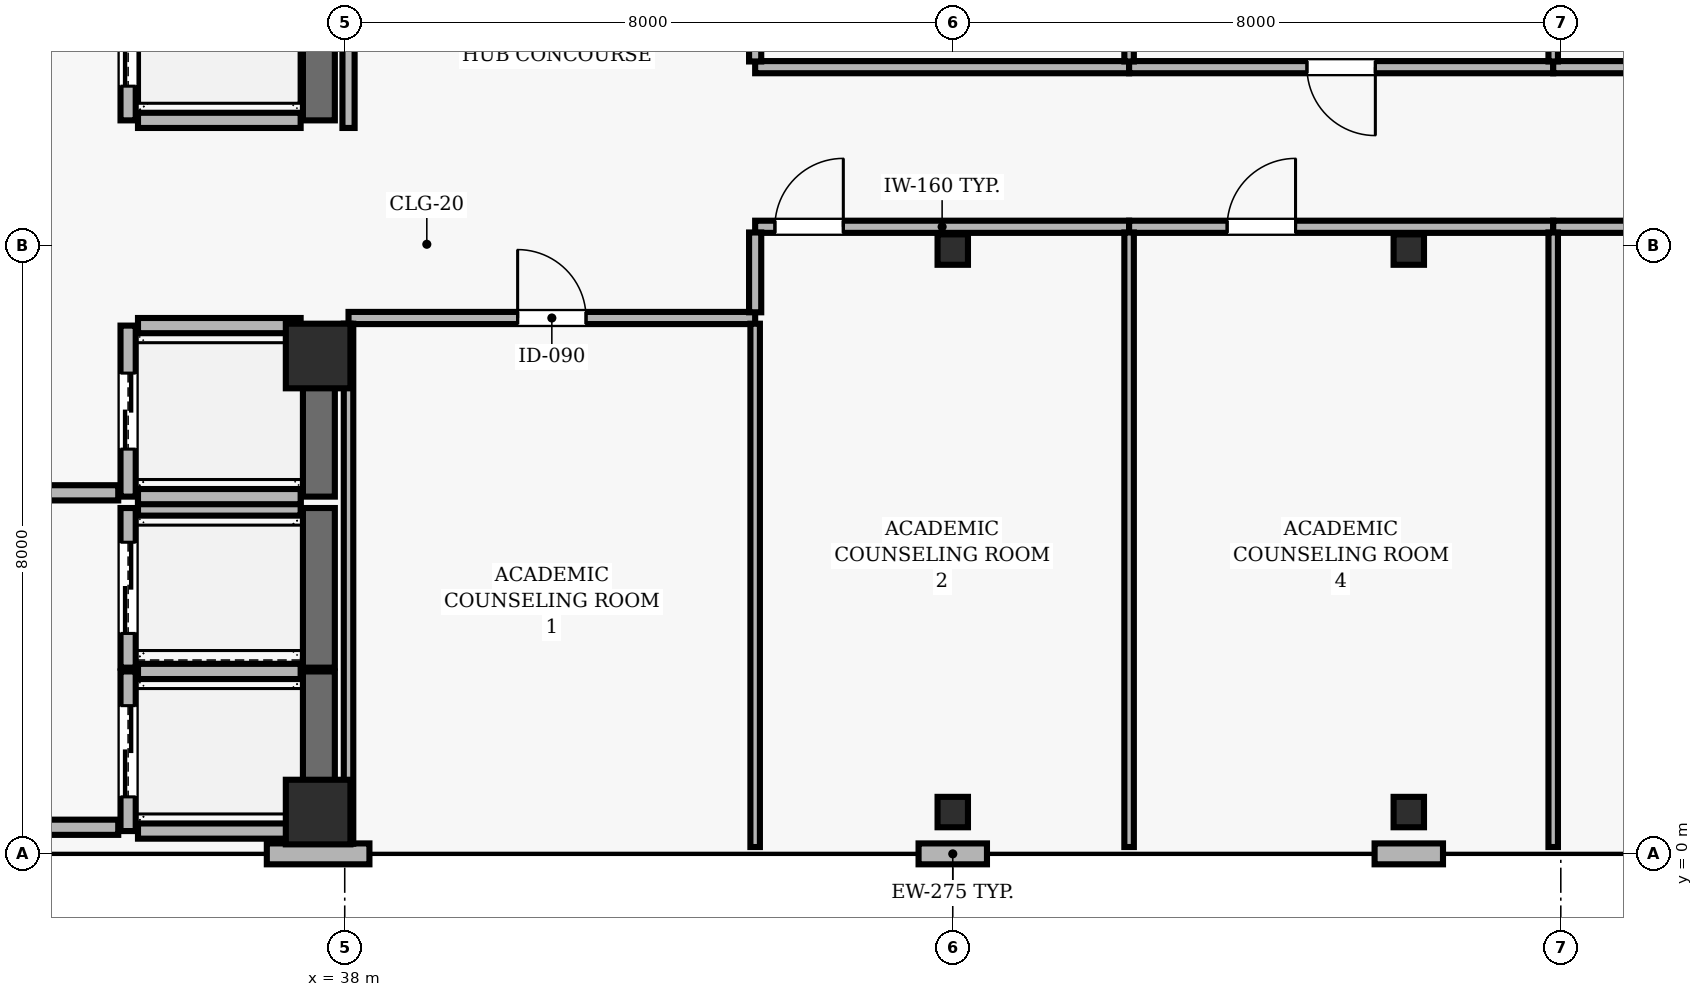
"""IFC4 building model, lengths in metres.
Left out: names, types, materials, properties, quantities, classifications, styles, units other than length and angle.
Written with IfcOpenShell. Run it as: python <this file> out.ifc"""

import sys

from ifc_helpers import new_model, si_unit, direction, frame, frame_2d, origin, origin_2d, place, context, subcontext, project, spatial, rectangle, hollow_rectangle, extrude, element, fill, save


model = new_model("IFC4")
c1 = context("Model", 3, precision=1e-05, world=origin(), true_north=direction((0.0, 1.0)))
c2 = subcontext(c1, "Body", "Model", "MODEL_VIEW")
j1 = project(units=[si_unit("LENGTHUNIT", "METRE"), si_unit("PLANEANGLEUNIT", "RADIAN")], contexts=[c1])
p1 = place(None, origin())
s1 = spatial("IfcSite", under=j1, at=p1, CompositionType="ELEMENT")
p2 = place(p1, origin())
s2 = spatial("IfcBuilding", under=s1, at=p2, CompositionType="ELEMENT")
p3 = place(p2, frame((0.0, 0.0, 295.0)))
s3 = spatial("IfcBuildingStorey", under=s2, at=p3, CompositionType="ELEMENT", Elevation=295.0)
for number, where, z_axis, x_axis in (
    (1, (37.65, 0.55, 0.0), (0.0, 0.0, 1.0), (1.0, 0.0, 0.0)),
    (2, (37.65, 6.55, 0.0), (0.0, 0.0, 1.0), (1.0, 0.0, 0.0)),
):
    element("IfcColumn", number, at=place(p3, frame(where, z_axis=z_axis, x_axis=x_axis)), inside=s3, PredefinedType="COLUMN", context=c2, shape_type="SweptSolid", body=[
        extrude(rectangle(XDim=0.85, YDim=0.85, at=origin_2d()), origin(), (0.0, 0.0, 1.0), 3.9),
    ])
for number, where, z_axis, x_axis in (
    (3, (46.0, 0.55, 0.0), (0.0, 0.0, 1.0), (1.0, 0.0, 0.0)),
    (4, (46.0, 7.95, 0.0), (0.0, 0.0, 1.0), (1.0, 0.0, 0.0)),
    (5, (52.0, 0.55, 0.0), (0.0, 0.0, 1.0), (1.0, 0.0, 0.0)),
    (6, (52.0, 7.95, 0.0), (0.0, 0.0, 1.0), (1.0, 0.0, 0.0)),
):
    element("IfcColumn", number, at=place(p3, frame(where, z_axis=z_axis, x_axis=x_axis)), inside=s3, PredefinedType="COLUMN", context=c2, shape_type="SweptSolid", body=[
        extrude(hollow_rectangle(XDim=0.4, YDim=0.4, WallThickness=0.02, at=origin_2d()), origin(), (0.0, 0.0, 1.0), 3.9),
    ])
p4 = place(p3, frame((36.975, 0.0, 0.0), z_axis=(0.0, 0.0, 1.0), x_axis=(1.0, 0.0, 0.0)))
e7 = element("IfcWall", 7, at=p4, inside=s3, PredefinedType="SOLIDWALL", context=c2, shape_type="SweptSolid", body=[
    extrude(rectangle(XDim=1.35, YDim=0.275, at=frame_2d((0.675, 0.0))), origin(), (0.0, 0.0, 1.0), 3.69),
])
for number, where, z_axis, x_axis in (
    (8, (45.55, 0.0, 0.0), (0.0, 0.0, 1.0), (1.0, 0.0, 0.0)),
    (9, (51.55, 0.0, 0.0), (0.0, 0.0, 1.0), (1.0, 0.0, 0.0)),
):
    element("IfcWall", number, at=place(p3, frame(where, z_axis=z_axis, x_axis=x_axis)), inside=s3, PredefinedType="SOLIDWALL", context=c2, shape_type="SweptSolid", body=[
        extrude(rectangle(XDim=0.9, YDim=0.275, at=frame_2d((0.45, 0.0))), origin(), (0.0, 0.0, 1.0), 3.69),
    ])
p5 = place(p3, frame((35.15, 2.4, 0.0), z_axis=(0.0, 0.0, 1.0), x_axis=(0.0, -1.0, 0.0)))
e10 = element("IfcWall", 10, at=p5, inside=s3, PredefinedType="SOLIDWALL", context=c2, shape_type="SweptSolid", body=[
    extrude(rectangle(XDim=2.1, YDim=0.2, at=frame_2d((1.05, 0.0))), origin(), (0.0, 0.0, 1.0), 3.69),
])
p6 = place(p5, frame((0.45, 0.0, 0.0)))
e11 = element("IfcOpeningElement", 11, at=p6, cuts=e10, PredefinedType="OPENING", context=c2, shape_type="SweptSolid", body=[
    extrude(rectangle(XDim=1.2, YDim=2.15, at=frame_2d((0.6, 1.075))), frame((0.0, 0.11, 0.0), z_axis=(0.0, -1.0, 0.0), x_axis=(1.0, 0.0, 0.0)), (0.0, 0.0, 1.0), 0.22),
])
p7 = place(p3, frame((37.66, 0.3, 0.0), z_axis=(0.0, 0.0, 1.0), x_axis=(0.0, 1.0, 0.0)))
e12 = element("IfcWall", 12, at=p7, inside=s3, PredefinedType="SHEAR", context=c2, shape_type="SweptSolid", body=[
    extrude(rectangle(XDim=2.1, YDim=0.42, at=frame_2d((1.05, 0.0))), origin(), (0.0, 0.0, 1.0), 3.69),
])
for number, where, z_axis, x_axis in (
    (13, (35.28, 0.3, 0.0), (0.0, 0.0, 1.0), (1.0, 0.0, 0.0)),
    (14, (37.42, 2.4, 0.0), (0.0, 0.0, 1.0), (-1.0, 0.0, 0.0)),
):
    element("IfcWall", number, at=place(p3, frame(where, z_axis=z_axis, x_axis=x_axis)), inside=s3, PredefinedType="SOLIDWALL", context=c2, shape_type="SweptSolid", body=[
        extrude(rectangle(XDim=2.14, YDim=0.2, at=frame_2d((1.07, 0.0))), origin(), (0.0, 0.0, 1.0), 3.69),
    ])
p8 = place(p3, frame((35.15, 4.55, 0.0), z_axis=(0.0, 0.0, 1.0), x_axis=(0.0, -1.0, 0.0)))
e15 = element("IfcWall", 15, at=p8, inside=s3, PredefinedType="SOLIDWALL", context=c2, shape_type="SweptSolid", body=[
    extrude(rectangle(XDim=2.1, YDim=0.2, at=frame_2d((1.05, 0.0))), origin(), (0.0, 0.0, 1.0), 3.69),
])
p9 = place(p8, frame((0.45, 0.0, 0.0)))
e16 = element("IfcOpeningElement", 16, at=p9, cuts=e15, PredefinedType="OPENING", context=c2, shape_type="SweptSolid", body=[
    extrude(rectangle(XDim=1.2, YDim=2.15, at=frame_2d((0.6, 1.075))), frame((0.0, 0.11, 0.0), z_axis=(0.0, -1.0, 0.0), x_axis=(1.0, 0.0, 0.0)), (0.0, 0.0, 1.0), 0.22),
])
p10 = place(p3, frame((37.66, 2.45, 0.0), z_axis=(0.0, 0.0, 1.0), x_axis=(0.0, 1.0, 0.0)))
e17 = element("IfcWall", 17, at=p10, inside=s3, PredefinedType="SHEAR", context=c2, shape_type="SweptSolid", body=[
    extrude(rectangle(XDim=2.1, YDim=0.42, at=frame_2d((1.05, 0.0))), origin(), (0.0, 0.0, 1.0), 3.69),
])
p11 = place(p3, frame((37.42, 4.55, 0.0), z_axis=(0.0, 0.0, 1.0), x_axis=(-1.0, 0.0, 0.0)))
e18 = element("IfcWall", 18, at=p11, inside=s3, PredefinedType="SOLIDWALL", context=c2, shape_type="SweptSolid", body=[
    extrude(rectangle(XDim=2.14, YDim=0.2, at=frame_2d((1.07, 0.0))), origin(), (0.0, 0.0, 1.0), 3.69),
])
p12 = place(p3, frame((35.15, 6.95, 0.0), z_axis=(0.0, 0.0, 1.0), x_axis=(0.0, -1.0, 0.0)))
e19 = element("IfcWall", 19, at=p12, inside=s3, PredefinedType="SOLIDWALL", context=c2, shape_type="SweptSolid", body=[
    extrude(rectangle(XDim=2.25, YDim=0.2, at=frame_2d((1.125, 0.0))), origin(), (0.0, 0.0, 1.0), 3.69),
])
p13 = place(p12, frame((0.625, 0.0, 0.0)))
e20 = element("IfcOpeningElement", 20, at=p13, cuts=e19, PredefinedType="OPENING", context=c2, shape_type="SweptSolid", body=[
    extrude(rectangle(XDim=1.0, YDim=2.1, at=frame_2d((0.5, 1.05))), frame((0.0, 0.11, 0.0), z_axis=(0.0, -1.0, 0.0), x_axis=(1.0, 0.0, 0.0)), (0.0, 0.0, 1.0), 0.22),
])
p14 = place(p3, frame((37.66, 4.7, 0.0), z_axis=(0.0, 0.0, 1.0), x_axis=(0.0, 1.0, 0.0)))
e21 = element("IfcWall", 21, at=p14, inside=s3, PredefinedType="SHEAR", context=c2, shape_type="SweptSolid", body=[
    extrude(rectangle(XDim=2.25, YDim=0.42, at=frame_2d((1.125, 0.0))), origin(), (0.0, 0.0, 1.0), 3.69),
])
for number, where, z_axis, x_axis in (
    (22, (35.28, 4.7, 0.0), (0.0, 0.0, 1.0), (1.0, 0.0, 0.0)),
    (23, (37.42, 6.95, 0.0), (0.0, 0.0, 1.0), (-1.0, 0.0, 0.0)),
):
    element("IfcWall", number, at=place(p3, frame(where, z_axis=z_axis, x_axis=x_axis)), inside=s3, PredefinedType="SOLIDWALL", context=c2, shape_type="SweptSolid", body=[
        extrude(rectangle(XDim=2.14, YDim=0.2, at=frame_2d((1.07, 0.0))), origin(), (0.0, 0.0, 1.0), 3.69),
    ])
p15 = place(p3, frame((35.15, 11.55, 0.0), z_axis=(0.0, 0.0, 1.0), x_axis=(0.0, -1.0, 0.0)))
e24 = element("IfcWall", 24, at=p15, inside=s3, PredefinedType="SOLIDWALL", context=c2, shape_type="SweptSolid", body=[
    extrude(rectangle(XDim=1.9, YDim=0.2, at=frame_2d((0.95, 0.0))), origin(), (0.0, 0.0, 1.0), 3.69),
])
p16 = place(p15, frame((0.45, 0.0, 0.0)))
e25 = element("IfcOpeningElement", 25, at=p16, cuts=e24, PredefinedType="OPENING", context=c2, shape_type="SweptSolid", body=[
    extrude(rectangle(XDim=1.0, YDim=2.1, at=frame_2d((0.5, 1.05))), frame((0.0, 0.11, 0.0), z_axis=(0.0, -1.0, 0.0), x_axis=(1.0, 0.0, 0.0)), (0.0, 0.0, 1.0), 0.22),
])
p17 = place(p3, frame((37.66, 9.65, 0.0), z_axis=(0.0, 0.0, 1.0), x_axis=(0.0, 1.0, 0.0)))
e26 = element("IfcWall", 26, at=p17, inside=s3, PredefinedType="SHEAR", context=c2, shape_type="SweptSolid", body=[
    extrude(rectangle(XDim=1.9, YDim=0.42, at=frame_2d((0.95, 0.0))), origin(), (0.0, 0.0, 1.0), 3.69),
])
p18 = place(p3, frame((35.28, 9.65, 0.0), z_axis=(0.0, 0.0, 1.0), x_axis=(1.0, 0.0, 0.0)))
e27 = element("IfcWall", 27, at=p18, inside=s3, PredefinedType="SOLIDWALL", context=c2, shape_type="SweptSolid", body=[
    extrude(rectangle(XDim=2.14, YDim=0.2, at=frame_2d((1.07, 0.0))), origin(), (0.0, 0.0, 1.0), 3.69),
])
p19 = place(p3, frame((31.65, 0.35, 0.0), z_axis=(0.0, 0.0, 1.0), x_axis=(1.0, 0.0, 0.0)))
e28 = element("IfcWall", 28, at=p19, inside=s3, PredefinedType="SOLIDWALL", context=c2, shape_type="SweptSolid", body=[
    extrude(rectangle(XDim=3.37, YDim=0.2, at=frame_2d((1.685, 0.0))), origin(), (0.0, 0.0, 1.0), 3.69),
])
p20 = place(p3, frame((35.02, 4.75, 0.0), z_axis=(0.0, 0.0, 1.0), x_axis=(-1.0, 0.0, 0.0)))
e29 = element("IfcWall", 29, at=p20, inside=s3, PredefinedType="SOLIDWALL", context=c2, shape_type="SweptSolid", body=[
    extrude(rectangle(XDim=3.11, YDim=0.2, at=frame_2d((1.555, 0.0))), origin(), (0.0, 0.0, 1.0), 3.69),
])
p21 = place(p20, frame((1.03, 0.0, 0.0)))
e30 = element("IfcOpeningElement", 30, at=p21, cuts=e29, PredefinedType="OPENING", context=c2, shape_type="SweptSolid", body=[
    extrude(rectangle(XDim=1.05, YDim=2.15, at=frame_2d((0.525, 1.075))), frame((0.0, 0.11, 0.0), z_axis=(0.0, -1.0, 0.0), x_axis=(1.0, 0.0, 0.0)), (0.0, 0.0, 1.0), 0.22),
])
p22 = place(p3, frame((38.05, 7.05, 0.0), z_axis=(0.0, 0.0, 1.0), x_axis=(1.0, 0.0, 0.0)))
e31 = element("IfcWall", 31, at=p22, inside=s3, PredefinedType="PARTITIONING", context=c2, shape_type="SweptSolid", body=[
    extrude(rectangle(XDim=5.35, YDim=0.16, at=frame_2d((2.675, 0.0))), origin(), (0.0, 0.0, 1.0), 3.69),
])
p23 = place(p22, frame((2.225, 0.0, 0.0)))
e32 = element("IfcOpeningElement", 32, at=p23, cuts=e31, PredefinedType="OPENING", context=c2, shape_type="SweptSolid", body=[
    extrude(rectangle(XDim=0.9, YDim=2.1, at=frame_2d((0.45, 1.05))), frame((0.0, 0.09, 0.0), z_axis=(0.0, -1.0, 0.0), x_axis=(1.0, 0.0, 0.0)), (0.0, 0.0, 1.0), 0.18),
])
p24 = place(p3, frame((43.4, 8.25, 0.0), z_axis=(0.0, 0.0, 1.0), x_axis=(1.0, 0.0, 0.0)))
e33 = element("IfcWall", 33, at=p24, inside=s3, PredefinedType="PARTITIONING", context=c2, shape_type="SweptSolid", body=[
    extrude(rectangle(XDim=4.92, YDim=0.16, at=frame_2d((2.46, 0.0))), origin(), (0.0, 0.0, 1.0), 3.221),
])
p25 = place(p24, frame((0.26, 0.0, 0.0)))
e34 = element("IfcOpeningElement", 34, at=p25, cuts=e33, PredefinedType="OPENING", context=c2, shape_type="SweptSolid", body=[
    extrude(rectangle(XDim=0.9, YDim=2.1, at=frame_2d((0.45, 1.05))), frame((0.0, 0.09, 0.0), z_axis=(0.0, -1.0, 0.0), x_axis=(1.0, 0.0, 0.0)), (0.0, 0.0, 1.0), 0.18),
])
p26 = place(p3, frame((48.32, 8.25, 0.0), z_axis=(0.0, 0.0, 1.0), x_axis=(1.0, 0.0, 0.0)))
e35 = element("IfcWall", 35, at=p26, inside=s3, PredefinedType="PARTITIONING", context=c2, shape_type="SweptSolid", body=[
    extrude(rectangle(XDim=5.58, YDim=0.16, at=frame_2d((2.79, 0.0))), origin(), (0.0, 0.0, 1.0), 3.221),
])
p27 = place(p26, frame((1.29, 0.0, 0.0)))
e36 = element("IfcOpeningElement", 36, at=p27, cuts=e35, PredefinedType="OPENING", context=c2, shape_type="SweptSolid", body=[
    extrude(rectangle(XDim=0.9, YDim=2.1, at=frame_2d((0.45, 1.05))), frame((0.0, 0.09, 0.0), z_axis=(0.0, -1.0, 0.0), x_axis=(1.0, 0.0, 0.0)), (0.0, 0.0, 1.0), 0.18),
])
p28 = place(p3, frame((48.32, 10.35, 0.0), z_axis=(0.0, 0.0, 1.0), x_axis=(-1.0, 0.0, 0.0)))
e37 = element("IfcWall", 37, at=p28, inside=s3, PredefinedType="PARTITIONING", context=c2, shape_type="SweptSolid", body=[
    extrude(rectangle(XDim=4.92, YDim=0.16, at=frame_2d((2.46, 0.0))), origin(), (0.0, 0.0, 1.0), 3.372),
])
p29 = place(p3, frame((53.9, 8.25, 0.0), z_axis=(0.0, 0.0, 1.0), x_axis=(1.0, 0.0, 0.0)))
e38 = element("IfcWall", 38, at=p29, inside=s3, PredefinedType="PARTITIONING", context=c2, shape_type="SweptSolid", body=[
    extrude(rectangle(XDim=5.767, YDim=0.16, at=frame_2d((2.884, 0.0))), origin(), (0.0, 0.0, 1.0), 3.221),
])
p30 = place(p29, frame((1.384, 0.0, 0.0)))
e39 = element("IfcOpeningElement", 39, at=p30, cuts=e38, PredefinedType="OPENING", context=c2, shape_type="SweptSolid", body=[
    extrude(rectangle(XDim=0.9, YDim=2.1, at=frame_2d((0.45, 1.05))), frame((0.0, 0.09, 0.0), z_axis=(0.0, -1.0, 0.0), x_axis=(1.0, 0.0, 0.0)), (0.0, 0.0, 1.0), 0.18),
])
p31 = place(p3, frame((53.9, 10.35, 0.0), z_axis=(0.0, 0.0, 1.0), x_axis=(-1.0, 0.0, 0.0)))
e40 = element("IfcWall", 40, at=p31, inside=s3, PredefinedType="PARTITIONING", context=c2, shape_type="SweptSolid", body=[
    extrude(rectangle(XDim=5.58, YDim=0.16, at=frame_2d((2.79, 0.0))), origin(), (0.0, 0.0, 1.0), 3.372),
])
p32 = place(p31, frame((2.34, 0.0, 0.0)))
e41 = element("IfcOpeningElement", 41, at=p32, cuts=e40, PredefinedType="OPENING", context=c2, shape_type="SweptSolid", body=[
    extrude(rectangle(XDim=0.9, YDim=2.1, at=frame_2d((0.45, 1.05))), frame((0.0, 0.09, 0.0), z_axis=(0.0, -1.0, 0.0), x_axis=(1.0, 0.0, 0.0)), (0.0, 0.0, 1.0), 0.18),
])
p33 = place(p3, frame((59.667, 10.35, 0.0), z_axis=(0.0, 0.0, 1.0), x_axis=(-1.0, 0.0, 0.0)))
e42 = element("IfcWall", 42, at=p33, inside=s3, PredefinedType="PARTITIONING", context=c2, shape_type="SweptSolid", body=[
    extrude(rectangle(XDim=5.767, YDim=0.16, at=frame_2d((2.884, 0.0))), origin(), (0.0, 0.0, 1.0), 3.372),
])
p34 = place(p33, frame((2.434, 0.0, 0.0)))
e43 = element("IfcOpeningElement", 43, at=p34, cuts=e42, PredefinedType="OPENING", context=c2, shape_type="SweptSolid", body=[
    extrude(rectangle(XDim=0.9, YDim=2.1, at=frame_2d((0.45, 1.05))), frame((0.0, 0.09, 0.0), z_axis=(0.0, -1.0, 0.0), x_axis=(1.0, 0.0, 0.0)), (0.0, 0.0, 1.0), 0.18),
])
p35 = place(p3, frame((38.05, 6.975, 0.0), z_axis=(0.0, 0.0, 1.0), x_axis=(0.0, -1.0, 0.0)))
e44 = element("IfcWall", 44, at=p35, inside=s3, PredefinedType="PARTITIONING", context=c2, shape_type="SweptSolid", body=[
    extrude(rectangle(XDim=6.842, YDim=0.125, at=frame_2d((3.421, 0.0))), origin(), (0.0, 0.0, 1.0), 3.221),
])
p36 = place(p3, frame((38.05, 15.925, 0.0), z_axis=(0.0, 0.0, 1.0), x_axis=(0.0, -1.0, 0.0)))
e45 = element("IfcWall", 45, at=p36, inside=s3, PredefinedType="PARTITIONING", context=c2, shape_type="SweptSolid", body=[
    extrude(rectangle(XDim=6.375, YDim=0.16, at=frame_2d((3.188, 0.0))), origin(), (0.0, 0.0, 1.0), 3.221),
])
p37 = place(p3, frame((43.4, 0.09, 0.0), z_axis=(0.0, 0.0, 1.0), x_axis=(0.0, 1.0, 0.0)))
e46 = element("IfcWall", 46, at=p37, inside=s3, PredefinedType="PARTITIONING", context=c2, shape_type="SweptSolid", body=[
    extrude(rectangle(XDim=6.885, YDim=0.125, at=frame_2d((3.442, 0.0))), origin(), (0.0, 0.0, 1.0), 3.69),
])
p38 = place(p3, frame((43.4, 7.125, 0.0), z_axis=(0.0, 0.0, 1.0), x_axis=(0.0, 1.0, 0.0)))
e47 = element("IfcWall", 47, at=p38, inside=s3, PredefinedType="PARTITIONING", context=c2, shape_type="SweptSolid", body=[
    extrude(rectangle(XDim=1.05, YDim=0.16, at=frame_2d((0.525, 0.0))), origin(), (0.0, 0.0, 1.0), 3.69),
])
p39 = place(p3, frame((43.4, 10.425, 0.0), z_axis=(0.0, 0.0, 1.0), x_axis=(0.0, 1.0, 0.0)))
e48 = element("IfcWall", 48, at=p39, inside=s3, PredefinedType="PARTITIONING", context=c2, shape_type="SweptSolid", body=[
    extrude(rectangle(XDim=5.5, YDim=0.16, at=frame_2d((2.75, 0.0))), origin(), (0.0, 0.0, 1.0), 3.69),
])
p40 = place(p39, frame((2.3, 0.0, 0.0)))
e49 = element("IfcOpeningElement", 49, at=p40, cuts=e48, PredefinedType="OPENING", context=c2, shape_type="SweptSolid", body=[
    extrude(rectangle(XDim=0.9, YDim=2.1, at=frame_2d((0.45, 1.05))), frame((0.0, 0.09, 0.0), z_axis=(0.0, -1.0, 0.0), x_axis=(1.0, 0.0, 0.0)), (0.0, 0.0, 1.0), 0.18),
])
p41 = place(p3, frame((48.32, 0.09, 0.0), z_axis=(0.0, 0.0, 1.0), x_axis=(0.0, 1.0, 0.0)))
e50 = element("IfcWall", 50, at=p41, inside=s3, PredefinedType="PARTITIONING", context=c2, shape_type="SweptSolid", body=[
    extrude(rectangle(XDim=8.085, YDim=0.125, at=frame_2d((4.042, 0.0))), origin(), (0.0, 0.0, 1.0), 3.69),
])
p42 = place(p3, frame((48.32, 10.425, 0.0), z_axis=(0.0, 0.0, 1.0), x_axis=(0.0, 1.0, 0.0)))
e51 = element("IfcWall", 51, at=p42, inside=s3, PredefinedType="PARTITIONING", context=c2, shape_type="SweptSolid", body=[
    extrude(rectangle(XDim=5.442, YDim=0.125, at=frame_2d((2.721, 0.0))), origin(), (0.0, 0.0, 1.0), 3.69),
])
p43 = place(p3, frame((53.9, 0.09, 0.0), z_axis=(0.0, 0.0, 1.0), x_axis=(0.0, 1.0, 0.0)))
e52 = element("IfcWall", 52, at=p43, inside=s3, PredefinedType="PARTITIONING", context=c2, shape_type="SweptSolid", body=[
    extrude(rectangle(XDim=8.085, YDim=0.125, at=frame_2d((4.042, 0.0))), origin(), (0.0, 0.0, 1.0), 3.69),
])
p44 = place(p3, frame((53.9, 10.425, 0.0), z_axis=(0.0, 0.0, 1.0), x_axis=(0.0, 1.0, 0.0)))
e53 = element("IfcWall", 53, at=p44, inside=s3, PredefinedType="PARTITIONING", context=c2, shape_type="SweptSolid", body=[
    extrude(rectangle(XDim=5.442, YDim=0.125, at=frame_2d((2.721, 0.0))), origin(), (0.0, 0.0, 1.0), 3.69),
])
p45 = place(p6, origin())
e54 = element("IfcDoor", 54, at=p45, inside=s3, OperationType="DOUBLE_DOOR_SLIDING", PredefinedType="DOOR", context=c2, shape_type="SweptSolid", body=[
    extrude(rectangle(XDim=1.2, YDim=2.15, at=frame_2d((0.6, 1.075))), frame((0.0, 0.025, 0.0), z_axis=(0.0, -1.0, 0.0), x_axis=(1.0, 0.0, 0.0)), (0.0, 0.0, 1.0), 0.05),
])
fill(e11, e54)
p46 = place(p9, origin())
e55 = element("IfcDoor", 55, at=p46, inside=s3, OperationType="DOUBLE_DOOR_SLIDING", PredefinedType="DOOR", context=c2, shape_type="SweptSolid", body=[
    extrude(rectangle(XDim=1.2, YDim=2.15, at=frame_2d((0.6, 1.075))), frame((0.0, 0.025, 0.0), z_axis=(0.0, -1.0, 0.0), x_axis=(1.0, 0.0, 0.0)), (0.0, 0.0, 1.0), 0.05),
])
fill(e16, e55)
p47 = place(p13, origin())
e56 = element("IfcDoor", 56, at=p47, inside=s3, OperationType="DOUBLE_DOOR_SLIDING", PredefinedType="DOOR", context=c2, shape_type="SweptSolid", body=[
    extrude(rectangle(XDim=1.0, YDim=2.1, at=frame_2d((0.5, 1.05))), frame((0.0, 0.025, 0.0), z_axis=(0.0, -1.0, 0.0), x_axis=(1.0, 0.0, 0.0)), (0.0, 0.0, 1.0), 0.05),
])
fill(e20, e56)
p48 = place(p16, origin())
e57 = element("IfcDoor", 57, at=p48, inside=s3, OperationType="DOUBLE_DOOR_SLIDING", PredefinedType="DOOR", context=c2, shape_type="SweptSolid", body=[
    extrude(rectangle(XDim=1.0, YDim=2.1, at=frame_2d((0.5, 1.05))), frame((0.0, 0.025, 0.0), z_axis=(0.0, -1.0, 0.0), x_axis=(1.0, 0.0, 0.0)), (0.0, 0.0, 1.0), 0.05),
])
fill(e25, e57)
p49 = place(p23, origin())
e58 = element("IfcDoor", 58, at=p49, inside=s3, OperationType="SINGLE_SWING_LEFT", PredefinedType="DOOR", context=c2, shape_type="SweptSolid", body=[
    extrude(rectangle(XDim=0.9, YDim=2.1, at=frame_2d((0.45, 1.05))), frame((0.0, 0.025, 0.0), z_axis=(0.0, -1.0, 0.0), x_axis=(1.0, 0.0, 0.0)), (0.0, 0.0, 1.0), 0.05),
])
fill(e32, e58)
p50 = place(p25, origin())
e59 = element("IfcDoor", 59, at=p50, inside=s3, OperationType="SINGLE_SWING_RIGHT", PredefinedType="DOOR", context=c2, shape_type="SweptSolid", body=[
    extrude(rectangle(XDim=0.9, YDim=2.1, at=frame_2d((0.45, 1.05))), frame((0.0, 0.025, 0.0), z_axis=(0.0, -1.0, 0.0), x_axis=(1.0, 0.0, 0.0)), (0.0, 0.0, 1.0), 0.05),
])
fill(e34, e59)
p51 = place(p27, origin())
e60 = element("IfcDoor", 60, at=p51, inside=s3, OperationType="SINGLE_SWING_RIGHT", PredefinedType="DOOR", context=c2, shape_type="SweptSolid", body=[
    extrude(rectangle(XDim=0.9, YDim=2.1, at=frame_2d((0.45, 1.05))), frame((0.0, 0.025, 0.0), z_axis=(0.0, -1.0, 0.0), x_axis=(1.0, 0.0, 0.0)), (0.0, 0.0, 1.0), 0.05),
])
fill(e36, e60)
p52 = place(p32, origin())
e61 = element("IfcDoor", 61, at=p52, inside=s3, OperationType="SINGLE_SWING_LEFT", PredefinedType="DOOR", context=c2, shape_type="SweptSolid", body=[
    extrude(rectangle(XDim=0.9, YDim=2.1, at=frame_2d((0.45, 1.05))), frame((0.0, 0.025, 0.0), z_axis=(0.0, -1.0, 0.0), x_axis=(1.0, 0.0, 0.0)), (0.0, 0.0, 1.0), 0.05),
])
fill(e41, e61)
save(model, sys.argv[1])
